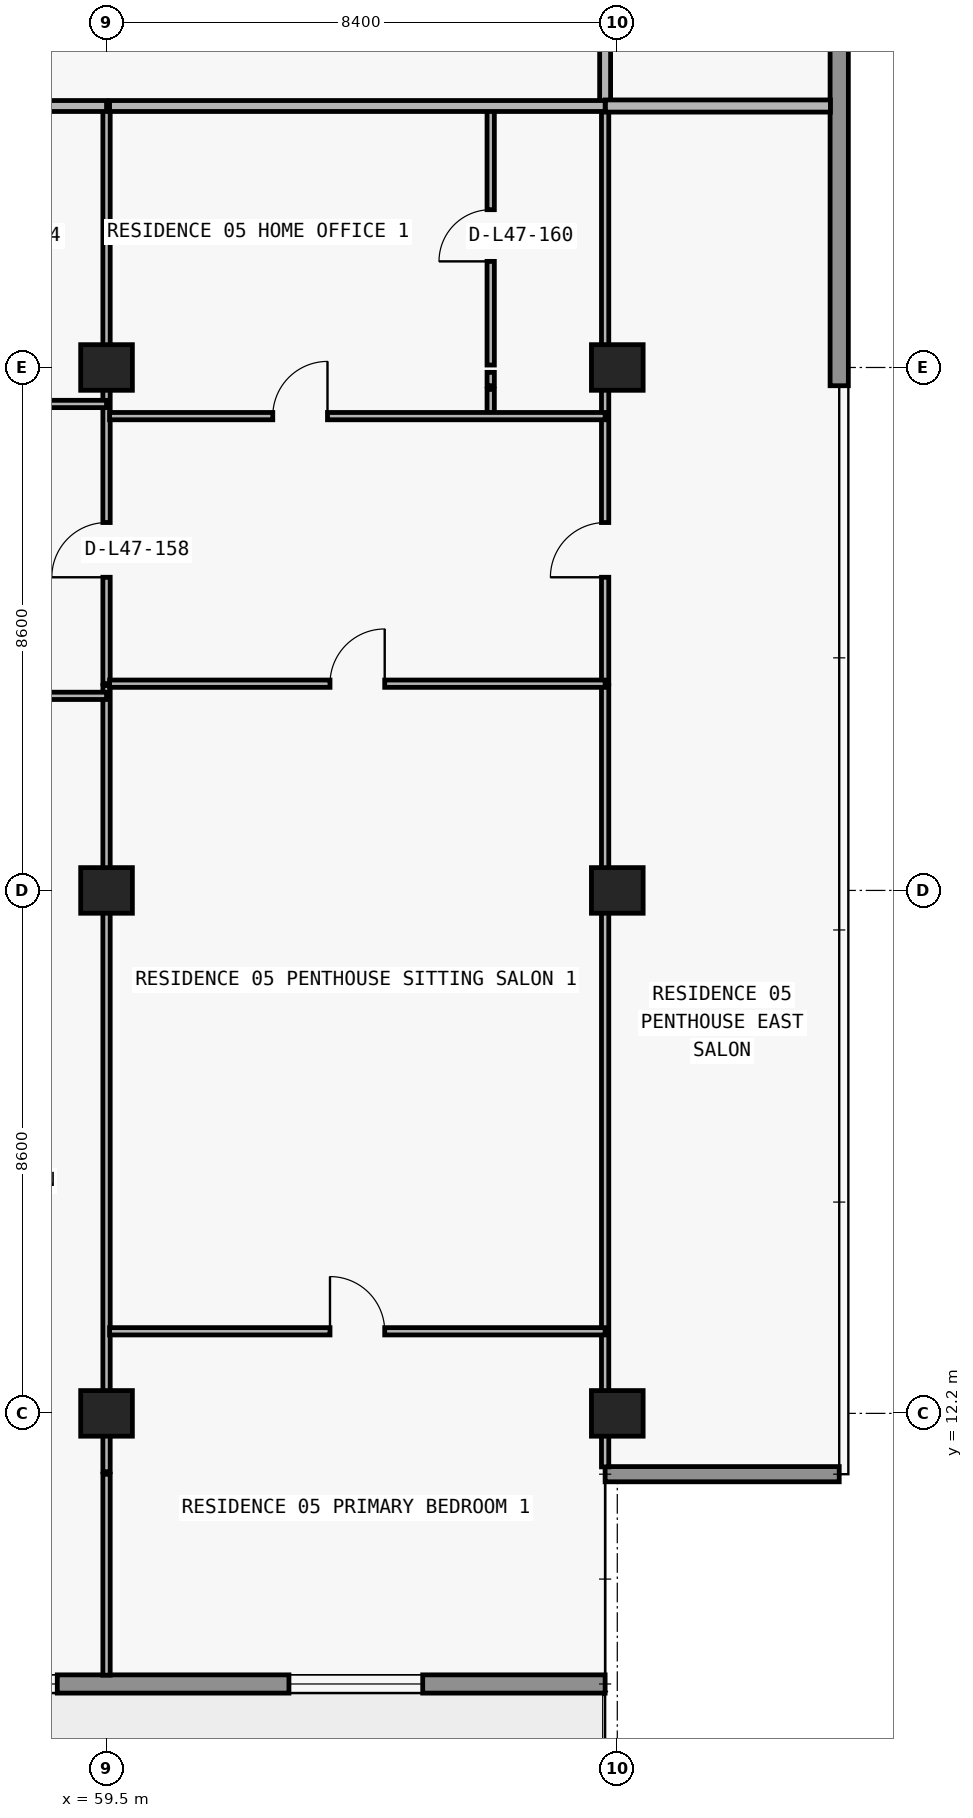
"""IFC4 building model, lengths in metres.
Left out: names, types, materials, properties, quantities, classifications, styles, units other than length and angle.
Written with IfcOpenShell. Run it as: python <this file> out.ifc"""

import sys

from ifc_helpers import new_model, si_unit, direction, frame, frame_2d, origin, origin_2d, place, context, subcontext, project, spatial, rectangle, extrude, element, fill, save


model = new_model("IFC4")
c1 = context("Model", 3, precision=1e-05, world=origin(), true_north=direction((0.0, 1.0)))
c2 = subcontext(c1, "Body", "Model", "MODEL_VIEW")
j1 = project(units=[si_unit("LENGTHUNIT", "METRE"), si_unit("PLANEANGLEUNIT", "RADIAN")], contexts=[c1])
p1 = place(None, origin())
s1 = spatial("IfcSite", under=j1, at=p1, CompositionType="ELEMENT")
p2 = place(p1, origin())
s2 = spatial("IfcBuilding", under=s1, at=p2, CompositionType="ELEMENT")
p3 = place(p2, frame((0.0, 0.0, 170.4)))
s3 = spatial("IfcBuildingStorey", under=s2, at=p3, CompositionType="ELEMENT", Elevation=170.4)
for number, where, z_axis, x_axis in (
    (1, (59.5, 12.2, 0.0), (0.0, 0.0, 1.0), (1.0, 0.0, 0.0)),
    (2, (67.9, 12.2, 0.0), (0.0, 0.0, 1.0), (1.0, 0.0, 0.0)),
    (3, (59.5, 20.8, 0.0), (0.0, 0.0, 1.0), (1.0, 0.0, 0.0)),
    (4, (67.9, 20.8, 0.0), (0.0, 0.0, 1.0), (1.0, 0.0, 0.0)),
    (5, (59.5, 29.4, 0.0), (0.0, 0.0, 1.0), (1.0, 0.0, 0.0)),
    (6, (67.9, 29.4, 0.0), (0.0, 0.0, 1.0), (1.0, 0.0, 0.0)),
):
    element("IfcColumn", number, at=place(p3, frame(where, z_axis=z_axis, x_axis=x_axis)), inside=s3, PredefinedType="COLUMN", context=c2, shape_type="SweptSolid", body=[
        extrude(rectangle(XDim=0.85, YDim=0.75, at=origin_2d()), origin(), (0.0, 0.0, 1.0), 3.05),
    ])
p4 = place(p3, frame((67.7, 7.75, 0.0), z_axis=(0.0, 0.0, 1.0), x_axis=(-1.0, 0.0, 0.0)))
e7 = element("IfcWall", 7, at=p4, inside=s3, PredefinedType="STANDARD", context=c2, shape_type="SweptSolid", body=[
    extrude(rectangle(XDim=57.6, YDim=0.3, at=frame_2d((28.8, 0.0))), origin(), (0.0, 0.0, 1.0), 3.05),
])
p5 = place(p4, frame((54.69, 0.0, 0.0)))
e8 = element("IfcOpeningElement", 8, at=p5, cuts=e7, PredefinedType="OPENING", context=c2, shape_type="SweptSolid", body=[
    extrude(rectangle(XDim=2.0, YDim=2.3, at=frame_2d((1.0, 1.15))), frame((0.0, 0.16, 0.0), z_axis=(0.0, -1.0, 0.0), x_axis=(1.0, 0.0, 0.0)), (0.0, 0.0, 1.0), 0.32),
])
p6 = place(p4, frame((50.21, 0.0, 0.65)))
e9 = element("IfcOpeningElement", 9, at=p6, cuts=e7, PredefinedType="OPENING", context=c2, shape_type="SweptSolid", body=[
    extrude(rectangle(XDim=2.6, YDim=1.85, at=frame_2d((1.3, 0.925))), frame((0.0, 0.16, 0.0), z_axis=(0.0, -1.0, 0.0), x_axis=(1.0, 0.0, 0.0)), (0.0, 0.0, 1.0), 0.32),
])
p7 = place(p4, frame((44.1, 0.0, 0.85)))
e10 = element("IfcOpeningElement", 10, at=p7, cuts=e7, PredefinedType="OPENING", context=c2, shape_type="SweptSolid", body=[
    extrude(rectangle(XDim=2.2, YDim=1.55, at=frame_2d((1.1, 0.775))), frame((0.0, 0.16, 0.0), z_axis=(0.0, -1.0, 0.0), x_axis=(1.0, 0.0, 0.0)), (0.0, 0.0, 1.0), 0.32),
])
p8 = place(p4, frame((37.69, 0.0, 0.0)))
e11 = element("IfcOpeningElement", 11, at=p8, cuts=e7, PredefinedType="OPENING", context=c2, shape_type="SweptSolid", body=[
    extrude(rectangle(XDim=2.0, YDim=2.3, at=frame_2d((1.0, 1.15))), frame((0.0, 0.16, 0.0), z_axis=(0.0, -1.0, 0.0), x_axis=(1.0, 0.0, 0.0)), (0.0, 0.0, 1.0), 0.32),
])
p9 = place(p4, frame((33.59, 0.0, 0.85)))
e12 = element("IfcOpeningElement", 12, at=p9, cuts=e7, PredefinedType="OPENING", context=c2, shape_type="SweptSolid", body=[
    extrude(rectangle(XDim=1.8, YDim=1.55, at=frame_2d((0.9, 0.775))), frame((0.0, 0.16, 0.0), z_axis=(0.0, -1.0, 0.0), x_axis=(1.0, 0.0, 0.0)), (0.0, 0.0, 1.0), 0.32),
])
p10 = place(p4, frame((25.914, 0.0, 0.85)))
e13 = element("IfcOpeningElement", 13, at=p10, cuts=e7, PredefinedType="OPENING", context=c2, shape_type="SweptSolid", body=[
    extrude(rectangle(XDim=2.2, YDim=1.55, at=frame_2d((1.1, 0.775))), frame((0.0, 0.16, 0.0), z_axis=(0.0, -1.0, 0.0), x_axis=(1.0, 0.0, 0.0)), (0.0, 0.0, 1.0), 0.32),
])
p11 = place(p4, frame((21.69, 0.0, 0.0)))
e14 = element("IfcOpeningElement", 14, at=p11, cuts=e7, PredefinedType="OPENING", context=c2, shape_type="SweptSolid", body=[
    extrude(rectangle(XDim=2.0, YDim=2.3, at=frame_2d((1.0, 1.15))), frame((0.0, 0.16, 0.0), z_axis=(0.0, -1.0, 0.0), x_axis=(1.0, 0.0, 0.0)), (0.0, 0.0, 1.0), 0.32),
])
p12 = place(p4, frame((17.59, 0.0, 0.85)))
e15 = element("IfcOpeningElement", 15, at=p12, cuts=e7, PredefinedType="OPENING", context=c2, shape_type="SweptSolid", body=[
    extrude(rectangle(XDim=1.8, YDim=1.55, at=frame_2d((0.9, 0.775))), frame((0.0, 0.16, 0.0), z_axis=(0.0, -1.0, 0.0), x_axis=(1.0, 0.0, 0.0)), (0.0, 0.0, 1.0), 0.32),
])
p13 = place(p4, frame((13.69, 0.0, 0.0)))
e16 = element("IfcOpeningElement", 16, at=p13, cuts=e7, PredefinedType="OPENING", context=c2, shape_type="SweptSolid", body=[
    extrude(rectangle(XDim=2.0, YDim=2.3, at=frame_2d((1.0, 1.15))), frame((0.0, 0.16, 0.0), z_axis=(0.0, -1.0, 0.0), x_axis=(1.0, 0.0, 0.0)), (0.0, 0.0, 1.0), 0.32),
])
p14 = place(p4, frame((9.01, 0.0, 0.65)))
e17 = element("IfcOpeningElement", 17, at=p14, cuts=e7, PredefinedType="OPENING", context=c2, shape_type="SweptSolid", body=[
    extrude(rectangle(XDim=2.6, YDim=1.85, at=frame_2d((1.3, 0.925))), frame((0.0, 0.16, 0.0), z_axis=(0.0, -1.0, 0.0), x_axis=(1.0, 0.0, 0.0)), (0.0, 0.0, 1.0), 0.32),
])
p15 = place(p4, frame((3.0, 0.0, 0.85)))
e18 = element("IfcOpeningElement", 18, at=p15, cuts=e7, PredefinedType="OPENING", context=c2, shape_type="SweptSolid", body=[
    extrude(rectangle(XDim=2.2, YDim=1.55, at=frame_2d((1.1, 0.775))), frame((0.0, 0.16, 0.0), z_axis=(0.0, -1.0, 0.0), x_axis=(1.0, 0.0, 0.0)), (0.0, 0.0, 1.0), 0.32),
])
p16 = place(p3, frame((67.7, 11.2, 0.0), z_axis=(0.0, 0.0, 1.0), x_axis=(1.0, 0.0, 0.0)))
e19 = element("IfcWall", 19, at=p16, inside=s3, PredefinedType="ELEMENTEDWALL", context=c2, shape_type="SweptSolid", body=[
    extrude(rectangle(XDim=3.85, YDim=0.25, at=frame_2d((1.925, 0.0))), origin(), (0.0, 0.0, 1.0), 3.05),
])
p17 = place(p3, frame((71.55, 47.0, 0.0), z_axis=(0.0, 0.0, 1.0), x_axis=(0.0, -1.0, 0.0)))
e20 = element("IfcWall", 20, at=p17, inside=s3, PredefinedType="STANDARD", context=c2, shape_type="SweptSolid", body=[
    extrude(rectangle(XDim=17.9, YDim=0.3, at=frame_2d((8.95, 0.0))), origin(), (0.0, 0.0, 1.0), 3.05),
])
p18 = place(p3, frame((59.5, 7.895, 0.0), z_axis=(0.0, 0.0, 1.0), x_axis=(0.0, 1.0, 0.0)))
e21 = element("IfcWall", 21, at=p18, inside=s3, PredefinedType="PARTITIONING", context=c2, shape_type="SweptSolid", body=[
    extrude(rectangle(XDim=3.305, YDim=0.12, at=frame_2d((1.652, 0.0))), origin(), (0.0, 0.0, 1.0), 3.05),
])
p19 = place(p3, frame((59.5, 11.24, 0.0), z_axis=(0.0, 0.0, 1.0), x_axis=(0.0, 1.0, 0.0)))
e22 = element("IfcWall", 22, at=p19, inside=s3, PredefinedType="PARTITIONING", context=c2, shape_type="SweptSolid", body=[
    extrude(rectangle(XDim=12.93, YDim=0.12, at=frame_2d((6.465, 0.0))), origin(), (0.0, 0.0, 1.0), 2.263),
])
p20 = place(p3, frame((59.5, 24.2, 0.0), z_axis=(0.0, 0.0, 1.0), x_axis=(0.0, 1.0, 0.0)))
e23 = element("IfcWall", 23, at=p20, inside=s3, PredefinedType="PARTITIONING", context=c2, shape_type="SweptSolid", body=[
    extrude(rectangle(XDim=4.84, YDim=0.12, at=frame_2d((2.42, 0.0))), origin(), (0.0, 0.0, 1.0), 2.263),
])
p21 = place(p20, frame((1.75, 0.0, 0.0)))
e24 = element("IfcOpeningElement", 24, at=p21, cuts=e23, PredefinedType="OPENING", context=c2, shape_type="SweptSolid", body=[
    extrude(rectangle(XDim=0.9, YDim=2.15, at=frame_2d((0.45, 1.075))), frame((0.0, 0.07, 0.0), z_axis=(0.0, -1.0, 0.0), x_axis=(1.0, 0.0, 0.0)), (0.0, 0.0, 1.0), 0.14),
])
p22 = place(p3, frame((59.5, 29.1, 0.0), z_axis=(0.0, 0.0, 1.0), x_axis=(0.0, 1.0, 0.0)))
e25 = element("IfcWall", 25, at=p22, inside=s3, PredefinedType="PARTITIONING", context=c2, shape_type="SweptSolid", body=[
    extrude(rectangle(XDim=0.22, YDim=0.12, at=frame_2d((0.11, 0.0))), origin(), (0.0, 0.0, 1.0), 3.05),
])
p23 = place(p3, frame((59.5, 29.44, 0.0), z_axis=(0.0, 0.0, 1.0), x_axis=(0.0, 1.0, 0.0)))
e26 = element("IfcWall", 26, at=p23, inside=s3, PredefinedType="PARTITIONING", context=c2, shape_type="SweptSolid", body=[
    extrude(rectangle(XDim=4.26, YDim=0.12, at=frame_2d((2.13, 0.0))), origin(), (0.0, 0.0, 1.0), 2.263),
])
p24 = place(p3, frame((65.818, 28.6, 0.0), z_axis=(0.0, 0.0, 1.0), x_axis=(0.0, 1.0, 0.0)))
e27 = element("IfcWall", 27, at=p24, inside=s3, PredefinedType="PARTITIONING", context=c2, shape_type="SweptSolid", body=[
    extrude(rectangle(XDim=0.44, YDim=0.12, at=frame_2d((0.22, 0.0))), origin(), (0.0, 0.0, 1.0), 3.05),
])
p25 = place(p3, frame((65.818, 29.1, 0.0), z_axis=(0.0, 0.0, 1.0), x_axis=(0.0, 1.0, 0.0)))
e28 = element("IfcWall", 28, at=p25, inside=s3, PredefinedType="PARTITIONING", context=c2, shape_type="SweptSolid", body=[
    extrude(rectangle(XDim=0.22, YDim=0.12, at=frame_2d((0.11, 0.0))), origin(), (0.0, 0.0, 1.0), 3.05),
])
p26 = place(p3, frame((65.818, 29.44, 0.0), z_axis=(0.0, 0.0, 1.0), x_axis=(0.0, 1.0, 0.0)))
e29 = element("IfcWall", 29, at=p26, inside=s3, PredefinedType="PARTITIONING", context=c2, shape_type="SweptSolid", body=[
    extrude(rectangle(XDim=4.26, YDim=0.12, at=frame_2d((2.13, 0.0))), origin(), (0.0, 0.0, 1.0), 3.05),
])
p27 = place(p26, frame((1.705, 0.0, 0.0)))
e30 = element("IfcOpeningElement", 30, at=p27, cuts=e29, PredefinedType="OPENING", context=c2, shape_type="SweptSolid", body=[
    extrude(rectangle(XDim=0.85, YDim=2.1, at=frame_2d((0.425, 1.05))), frame((0.0, 0.07, 0.0), z_axis=(0.0, -1.0, 0.0), x_axis=(1.0, 0.0, 0.0)), (0.0, 0.0, 1.0), 0.14),
])
p28 = place(p3, frame((67.7, 11.32, 0.0), z_axis=(0.0, 0.0, 1.0), x_axis=(0.0, 1.0, 0.0)))
e31 = element("IfcWall", 31, at=p28, inside=s3, PredefinedType="PARTITIONING", context=c2, shape_type="SweptSolid", body=[
    extrude(rectangle(XDim=12.85, YDim=0.12, at=frame_2d((6.425, 0.0))), origin(), (0.0, 0.0, 1.0), 2.263),
])
p29 = place(p3, frame((67.7, 24.2, 0.0), z_axis=(0.0, 0.0, 1.0), x_axis=(0.0, 1.0, 0.0)))
e32 = element("IfcWall", 32, at=p29, inside=s3, PredefinedType="PARTITIONING", context=c2, shape_type="SweptSolid", body=[
    extrude(rectangle(XDim=4.84, YDim=0.12, at=frame_2d((2.42, 0.0))), origin(), (0.0, 0.0, 1.0), 2.263),
])
p30 = place(p29, frame((1.75, 0.0, 0.0)))
e33 = element("IfcOpeningElement", 33, at=p30, cuts=e32, PredefinedType="OPENING", context=c2, shape_type="SweptSolid", body=[
    extrude(rectangle(XDim=0.9, YDim=2.15, at=frame_2d((0.45, 1.075))), frame((0.0, 0.07, 0.0), z_axis=(0.0, -1.0, 0.0), x_axis=(1.0, 0.0, 0.0)), (0.0, 0.0, 1.0), 0.14),
])
p31 = place(p3, frame((67.7, 29.1, 0.0), z_axis=(0.0, 0.0, 1.0), x_axis=(0.0, 1.0, 0.0)))
e34 = element("IfcWall", 34, at=p31, inside=s3, PredefinedType="PARTITIONING", context=c2, shape_type="SweptSolid", body=[
    extrude(rectangle(XDim=0.22, YDim=0.12, at=frame_2d((0.11, 0.0))), origin(), (0.0, 0.0, 1.0), 3.05),
])
p32 = place(p3, frame((67.7, 29.44, 0.0), z_axis=(0.0, 0.0, 1.0), x_axis=(0.0, 1.0, 0.0)))
e35 = element("IfcWall", 35, at=p32, inside=s3, PredefinedType="PARTITIONING", context=c2, shape_type="SweptSolid", body=[
    extrude(rectangle(XDim=4.26, YDim=0.12, at=frame_2d((2.13, 0.0))), origin(), (0.0, 0.0, 1.0), 2.263),
])
p33 = place(p3, frame((67.7, 33.705, 0.0), z_axis=(0.0, 0.0, 1.0), x_axis=(0.0, 1.0, 0.0)))
e36 = element("IfcWall", 36, at=p33, inside=s3, PredefinedType="PARTITIONING", context=c2, shape_type="SweptSolid", body=[
    extrude(rectangle(XDim=3.245, YDim=0.18, at=frame_2d((1.623, 0.0))), origin(), (0.0, 0.0, 1.0), 2.263),
])
p34 = place(p3, frame((59.55, 13.55, 0.0), z_axis=(0.0, 0.0, 1.0), x_axis=(1.0, 0.0, 0.0)))
e37 = element("IfcWall", 37, at=p34, inside=s3, PredefinedType="PARTITIONING", context=c2, shape_type="SweptSolid", body=[
    extrude(rectangle(XDim=8.15, YDim=0.12, at=frame_2d((4.075, 0.0))), origin(), (0.0, 0.0, 1.0), 3.05),
])
p35 = place(p34, frame((3.625, 0.0, 0.0)))
e38 = element("IfcOpeningElement", 38, at=p35, cuts=e37, PredefinedType="OPENING", context=c2, shape_type="SweptSolid", body=[
    extrude(rectangle(XDim=0.9, YDim=2.15, at=frame_2d((0.45, 1.075))), frame((0.0, 0.07, 0.0), z_axis=(0.0, -1.0, 0.0), x_axis=(1.0, 0.0, 0.0)), (0.0, 0.0, 1.0), 0.14),
])
p36 = place(p3, frame((51.32, 24.0, 0.0), z_axis=(0.0, 0.0, 1.0), x_axis=(1.0, 0.0, 0.0)))
e39 = element("IfcWall", 39, at=p36, inside=s3, PredefinedType="PARTITIONING", context=c2, shape_type="SweptSolid", body=[
    extrude(rectangle(XDim=8.18, YDim=0.12, at=frame_2d((4.09, 0.0))), origin(), (0.0, 0.0, 1.0), 3.05),
])
p37 = place(p36, frame((1.33, 0.0, 0.0)))
e40 = element("IfcOpeningElement", 40, at=p37, cuts=e39, PredefinedType="OPENING", context=c2, shape_type="SweptSolid", body=[
    extrude(rectangle(XDim=0.9, YDim=2.15, at=frame_2d((0.45, 1.075))), frame((0.0, 0.07, 0.0), z_axis=(0.0, -1.0, 0.0), x_axis=(1.0, 0.0, 0.0)), (0.0, 0.0, 1.0), 0.14),
])
p38 = place(p3, frame((59.55, 24.2, 0.0), z_axis=(0.0, 0.0, 1.0), x_axis=(1.0, 0.0, 0.0)))
e41 = element("IfcWall", 41, at=p38, inside=s3, PredefinedType="PARTITIONING", context=c2, shape_type="SweptSolid", body=[
    extrude(rectangle(XDim=8.15, YDim=0.12, at=frame_2d((4.075, 0.0))), origin(), (0.0, 0.0, 1.0), 3.05),
])
p39 = place(p38, frame((3.625, 0.0, 0.0)))
e42 = element("IfcOpeningElement", 42, at=p39, cuts=e41, PredefinedType="OPENING", context=c2, shape_type="SweptSolid", body=[
    extrude(rectangle(XDim=0.9, YDim=2.15, at=frame_2d((0.45, 1.075))), frame((0.0, 0.07, 0.0), z_axis=(0.0, -1.0, 0.0), x_axis=(1.0, 0.0, 0.0)), (0.0, 0.0, 1.0), 0.14),
])
p40 = place(p3, frame((59.55, 28.6, 0.0), z_axis=(0.0, 0.0, 1.0), x_axis=(1.0, 0.0, 0.0)))
e43 = element("IfcWall", 43, at=p40, inside=s3, PredefinedType="PARTITIONING", context=c2, shape_type="SweptSolid", body=[
    extrude(rectangle(XDim=8.15, YDim=0.12, at=frame_2d((4.075, 0.0))), origin(), (0.0, 0.0, 1.0), 3.05),
])
p41 = place(p40, frame((2.684, 0.0, 0.0)))
e44 = element("IfcOpeningElement", 44, at=p41, cuts=e43, PredefinedType="OPENING", context=c2, shape_type="SweptSolid", body=[
    extrude(rectangle(XDim=0.9, YDim=2.15, at=frame_2d((0.45, 1.075))), frame((0.0, 0.07, 0.0), z_axis=(0.0, -1.0, 0.0), x_axis=(1.0, 0.0, 0.0)), (0.0, 0.0, 1.0), 0.14),
])
p42 = place(p3, frame((51.32, 28.8, 0.0), z_axis=(0.0, 0.0, 1.0), x_axis=(1.0, 0.0, 0.0)))
e45 = element("IfcWall", 45, at=p42, inside=s3, PredefinedType="PARTITIONING", context=c2, shape_type="SweptSolid", body=[
    extrude(rectangle(XDim=8.18, YDim=0.12, at=frame_2d((4.09, 0.0))), origin(), (0.0, 0.0, 1.0), 3.05),
])
p43 = place(p42, frame((1.33, 0.0, 0.0)))
e46 = element("IfcOpeningElement", 46, at=p43, cuts=e45, PredefinedType="OPENING", context=c2, shape_type="SweptSolid", body=[
    extrude(rectangle(XDim=0.9, YDim=2.15, at=frame_2d((0.45, 1.075))), frame((0.0, 0.07, 0.0), z_axis=(0.0, -1.0, 0.0), x_axis=(1.0, 0.0, 0.0)), (0.0, 0.0, 1.0), 0.14),
])
p44 = place(p3, frame((31.4, 33.7, 0.0), z_axis=(0.0, 0.0, 1.0), x_axis=(1.0, 0.0, 0.0)))
e47 = element("IfcWall", 47, at=p44, inside=s3, PredefinedType="PARTITIONING", context=c2, shape_type="SweptSolid", body=[
    extrude(rectangle(XDim=28.1, YDim=0.18, at=frame_2d((14.05, 0.0))), origin(), (0.0, 0.0, 1.0), 3.05),
])
p45 = place(p44, frame((5.97, 0.0, 0.0)))
e48 = element("IfcOpeningElement", 48, at=p45, cuts=e47, PredefinedType="OPENING", context=c2, shape_type="SweptSolid", body=[
    extrude(rectangle(XDim=1.0, YDim=2.2, at=frame_2d((0.5, 1.1))), frame((0.0, 0.1, 0.0), z_axis=(0.0, -1.0, 0.0), x_axis=(1.0, 0.0, 0.0)), (0.0, 0.0, 1.0), 0.2),
])
p46 = place(p44, frame((13.824, 0.0, 0.0)))
e49 = element("IfcOpeningElement", 49, at=p46, cuts=e47, PredefinedType="OPENING", context=c2, shape_type="SweptSolid", body=[
    extrude(rectangle(XDim=1.0, YDim=2.2, at=frame_2d((0.5, 1.1))), frame((0.0, 0.1, 0.0), z_axis=(0.0, -1.0, 0.0), x_axis=(1.0, 0.0, 0.0)), (0.0, 0.0, 1.0), 0.2),
])
p47 = place(p44, frame((22.349, 0.0, 0.0)))
e50 = element("IfcOpeningElement", 50, at=p47, cuts=e47, PredefinedType="OPENING", context=c2, shape_type="SweptSolid", body=[
    extrude(rectangle(XDim=1.0, YDim=2.2, at=frame_2d((0.5, 1.1))), frame((0.0, 0.1, 0.0), z_axis=(0.0, -1.0, 0.0), x_axis=(1.0, 0.0, 0.0)), (0.0, 0.0, 1.0), 0.2),
])
p48 = place(p3, frame((59.55, 33.7, 0.0), z_axis=(0.0, 0.0, 1.0), x_axis=(1.0, 0.0, 0.0)))
e51 = element("IfcWall", 51, at=p48, inside=s3, PredefinedType="PARTITIONING", context=c2, shape_type="SweptSolid", body=[
    extrude(rectangle(XDim=8.15, YDim=0.18, at=frame_2d((4.075, 0.0))), origin(), (0.0, 0.0, 1.0), 3.05),
])
p49 = place(p3, frame((67.705, 33.7, 0.0), z_axis=(0.0, 0.0, 1.0), x_axis=(1.0, 0.0, 0.0)))
e52 = element("IfcWall", 52, at=p49, inside=s3, PredefinedType="PARTITIONING", context=c2, shape_type="SweptSolid", body=[
    extrude(rectangle(XDim=3.7, YDim=0.2, at=frame_2d((1.85, 0.0))), origin(), (0.0, 0.0, 1.0), 3.05),
])
p50 = place(p14, origin())
e53 = element("IfcWindow", 53, at=p50, inside=s3, PartitioningType="SINGLE_PANEL", PredefinedType="WINDOW", context=c2, shape_type="SweptSolid", body=[
    extrude(rectangle(XDim=2.6, YDim=1.85, at=frame_2d((1.3, 0.925))), frame((0.0, 0.03, 0.0), z_axis=(0.0, -1.0, 0.0), x_axis=(1.0, 0.0, 0.0)), (0.0, 0.0, 1.0), 0.06),
])
fill(e17, e53)
p51 = place(p15, origin())
e54 = element("IfcWindow", 54, at=p51, inside=s3, PartitioningType="SINGLE_PANEL", PredefinedType="WINDOW", context=c2, shape_type="SweptSolid", body=[
    extrude(rectangle(XDim=2.2, YDim=1.55, at=frame_2d((1.1, 0.775))), frame((0.0, 0.03, 0.0), z_axis=(0.0, -1.0, 0.0), x_axis=(1.0, 0.0, 0.0)), (0.0, 0.0, 1.0), 0.06),
])
fill(e18, e54)
p52 = place(p21, origin())
e55 = element("IfcDoor", 55, at=p52, inside=s3, OperationType="SINGLE_SWING_LEFT", PredefinedType="DOOR", context=c2, shape_type="SweptSolid", body=[
    extrude(rectangle(XDim=0.9, YDim=2.15, at=frame_2d((0.45, 1.075))), frame((0.0, 0.025, 0.0), z_axis=(0.0, -1.0, 0.0), x_axis=(1.0, 0.0, 0.0)), (0.0, 0.0, 1.0), 0.05),
])
fill(e24, e55)
p53 = place(p41, origin())
e56 = element("IfcDoor", 56, at=p53, inside=s3, OperationType="SINGLE_SWING_RIGHT", PredefinedType="DOOR", context=c2, shape_type="SweptSolid", body=[
    extrude(rectangle(XDim=0.9, YDim=2.15, at=frame_2d((0.45, 1.075))), frame((0.0, 0.025, 0.0), z_axis=(0.0, -1.0, 0.0), x_axis=(1.0, 0.0, 0.0)), (0.0, 0.0, 1.0), 0.05),
])
fill(e44, e56)
p54 = place(p27, origin())
e57 = element("IfcDoor", 57, at=p54, inside=s3, OperationType="SINGLE_SWING_LEFT", PredefinedType="DOOR", context=c2, shape_type="SweptSolid", body=[
    extrude(rectangle(XDim=0.85, YDim=2.1, at=frame_2d((0.425, 1.05))), frame((0.0, 0.025, 0.0), z_axis=(0.0, -1.0, 0.0), x_axis=(1.0, 0.0, 0.0)), (0.0, 0.0, 1.0), 0.05),
])
fill(e30, e57)
p55 = place(p39, origin())
e58 = element("IfcDoor", 58, at=p55, inside=s3, OperationType="SINGLE_SWING_RIGHT", PredefinedType="DOOR", context=c2, shape_type="SweptSolid", body=[
    extrude(rectangle(XDim=0.9, YDim=2.15, at=frame_2d((0.45, 1.075))), frame((0.0, 0.025, 0.0), z_axis=(0.0, -1.0, 0.0), x_axis=(1.0, 0.0, 0.0)), (0.0, 0.0, 1.0), 0.05),
])
fill(e42, e58)
p56 = place(p35, origin())
e59 = element("IfcDoor", 59, at=p56, inside=s3, OperationType="SINGLE_SWING_LEFT", PredefinedType="DOOR", context=c2, shape_type="SweptSolid", body=[
    extrude(rectangle(XDim=0.9, YDim=2.15, at=frame_2d((0.45, 1.075))), frame((0.0, 0.025, 0.0), z_axis=(0.0, -1.0, 0.0), x_axis=(1.0, 0.0, 0.0)), (0.0, 0.0, 1.0), 0.05),
])
fill(e38, e59)
p57 = place(p30, origin())
e60 = element("IfcDoor", 60, at=p57, inside=s3, OperationType="SINGLE_SWING_LEFT", PredefinedType="DOOR", context=c2, shape_type="SweptSolid", body=[
    extrude(rectangle(XDim=0.9, YDim=2.15, at=frame_2d((0.45, 1.075))), frame((0.0, 0.025, 0.0), z_axis=(0.0, -1.0, 0.0), x_axis=(1.0, 0.0, 0.0)), (0.0, 0.0, 1.0), 0.05),
])
fill(e33, e60)
save(model, sys.argv[1])
